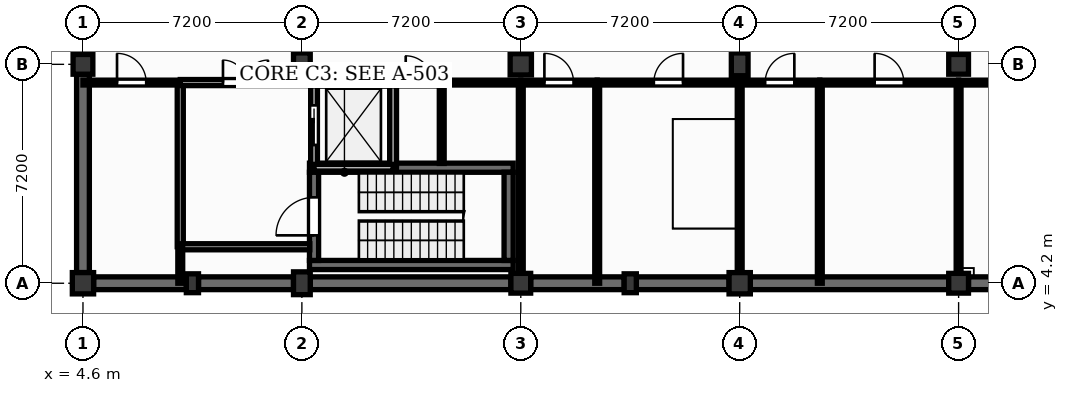
"""IFC4 building model, lengths in metres.
Left out: names, types, materials, properties, quantities, classifications, styles, units other than length and angle.
Written with IfcOpenShell. Run it as: python <this file> out.ifc"""

import sys

from ifc_helpers import new_model, si_unit, direction, frame, frame_2d, origin, origin_2d, place, context, subcontext, project, spatial, rectangle, extrude, element, fill, save


model = new_model("IFC4")
c1 = context("Model", 3, precision=1e-05, world=origin(), true_north=direction((0.0, 1.0)))
c2 = subcontext(c1, "Body", "Model", "MODEL_VIEW")
j1 = project(units=[si_unit("LENGTHUNIT", "METRE"), si_unit("PLANEANGLEUNIT", "RADIAN")], contexts=[c1])
p1 = place(None, origin())
s1 = spatial("IfcSite", under=j1, at=p1, CompositionType="ELEMENT")
p2 = place(p1, origin())
s2 = spatial("IfcBuilding", under=s1, at=p2, CompositionType="ELEMENT")
p3 = place(p2, frame((0.0, 0.0, -4.5)))
s3 = spatial("IfcBuildingStorey", under=s2, at=p3, CompositionType="ELEMENT", Elevation=-4.5)
p4 = place(p3, frame((4.6, 4.2, 0.0), z_axis=(0.0, 0.0, 1.0), x_axis=(1.0, 0.0, 0.0)))
e1 = element("IfcColumn", 1, at=p4, inside=s3, PredefinedType="COLUMN", context=c2, shape_type="SweptSolid", body=[
    extrude(rectangle(XDim=0.7, YDim=0.7, at=origin_2d()), origin(), (0.0, 0.0, 1.0), 4.2),
])
p5 = place(p3, frame((4.6, 11.4, 0.0), z_axis=(0.0, 0.0, 1.0), x_axis=(1.0, 0.0, 0.0)))
e2 = element("IfcColumn", 2, at=p5, inside=s3, PredefinedType="COLUMN", context=c2, shape_type="SweptSolid", body=[
    extrude(rectangle(XDim=0.65, YDim=0.65, at=origin_2d()), origin(), (0.0, 0.0, 1.0), 4.2),
])
for number, where, z_axis, x_axis in (
    (3, (11.8, 4.2, 0.0), (0.0, 0.0, 1.0), (1.0, 0.0, 0.0)),
    (4, (11.8, 11.4, 0.0), (0.0, 0.0, 1.0), (1.0, 0.0, 0.0)),
):
    element("IfcColumn", number, at=place(p3, frame(where, z_axis=z_axis, x_axis=x_axis)), inside=s3, PredefinedType="COLUMN", context=c2, shape_type="SweptSolid", body=[
        extrude(rectangle(XDim=0.55, YDim=0.75, at=origin_2d()), origin(), (0.0, 0.0, 1.0), 4.2),
    ])
p6 = place(p3, frame((19.0, 4.2, 0.0), z_axis=(0.0, 0.0, 1.0), x_axis=(1.0, 0.0, 0.0)))
e5 = element("IfcColumn", 5, at=p6, inside=s3, PredefinedType="COLUMN", context=c2, shape_type="SweptSolid", body=[
    extrude(rectangle(XDim=0.65, YDim=0.65, at=origin_2d()), origin(), (0.0, 0.0, 1.0), 4.2),
])
for number, where, z_axis, x_axis in (
    (6, (19.0, 11.4, 0.0), (0.0, 0.0, 1.0), (1.0, 0.0, 0.0)),
    (7, (26.2, 4.2, 0.0), (0.0, 0.0, 1.0), (1.0, 0.0, 0.0)),
):
    element("IfcColumn", number, at=place(p3, frame(where, z_axis=z_axis, x_axis=x_axis)), inside=s3, PredefinedType="COLUMN", context=c2, shape_type="SweptSolid", body=[
        extrude(rectangle(XDim=0.7, YDim=0.7, at=origin_2d()), origin(), (0.0, 0.0, 1.0), 4.2),
    ])
p7 = place(p3, frame((26.2, 11.4, 0.0), z_axis=(0.0, 0.0, 1.0), x_axis=(1.0, 0.0, 0.0)))
e8 = element("IfcColumn", 8, at=p7, inside=s3, PredefinedType="COLUMN", context=c2, shape_type="SweptSolid", body=[
    extrude(rectangle(XDim=0.55, YDim=0.75, at=origin_2d()), origin(), (0.0, 0.0, 1.0), 4.2),
])
for number, where, z_axis, x_axis in (
    (9, (33.4, 4.2, 0.0), (0.0, 0.0, 1.0), (1.0, 0.0, 0.0)),
    (10, (33.4, 11.4, 0.0), (0.0, 0.0, 1.0), (1.0, 0.0, 0.0)),
):
    element("IfcColumn", number, at=place(p3, frame(where, z_axis=z_axis, x_axis=x_axis)), inside=s3, PredefinedType="COLUMN", context=c2, shape_type="SweptSolid", body=[
        extrude(rectangle(XDim=0.65, YDim=0.65, at=origin_2d()), origin(), (0.0, 0.0, 1.0), 4.2),
    ])
for number, where, z_axis, x_axis in (
    (11, (8.2, 4.2, 0.0), (0.0, 0.0, 1.0), (1.0, 0.0, 0.0)),
    (12, (22.6, 4.2, 0.0), (0.0, 0.0, 1.0), (1.0, 0.0, 0.0)),
):
    element("IfcColumn", number, at=place(p3, frame(where, z_axis=z_axis, x_axis=x_axis)), inside=s3, PredefinedType="PILASTER", context=c2, shape_type="SweptSolid", body=[
        extrude(rectangle(XDim=0.4, YDim=0.62, at=origin_2d()), origin(), (0.0, 0.0, 1.0), 4.2),
    ])
p8 = place(p3, frame((4.95, 4.2, 0.0), z_axis=(0.0, 0.0, 1.0), x_axis=(1.0, 0.0, 0.0)))
e13 = element("IfcWall", 13, at=p8, inside=s3, PredefinedType="USERDEFINED", context=c2, shape_type="SweptSolid", body=[
    extrude(rectangle(XDim=3.05, YDim=0.42, at=frame_2d((1.525, 0.0))), origin(), (0.0, 0.0, 1.0), 4.2),
])
p9 = place(p3, frame((8.4, 4.2, 0.0), z_axis=(0.0, 0.0, 1.0), x_axis=(1.0, 0.0, 0.0)))
e14 = element("IfcWall", 14, at=p9, inside=s3, PredefinedType="USERDEFINED", context=c2, shape_type="SweptSolid", body=[
    extrude(rectangle(XDim=3.125, YDim=0.42, at=frame_2d((1.562, 0.0))), origin(), (0.0, 0.0, 1.0), 4.2),
])
p10 = place(p3, frame((4.6, 4.55, 0.0), z_axis=(0.0, 0.0, 1.0), x_axis=(0.0, 1.0, 0.0)))
e15 = element("IfcWall", 15, at=p10, inside=s3, PredefinedType="USERDEFINED", context=c2, shape_type="SweptSolid", body=[
    extrude(rectangle(XDim=6.525, YDim=0.42, at=frame_2d((3.262, 0.0))), origin(), (0.0, 0.0, 1.0), 4.2),
])
p11 = place(p3, frame((4.6, 11.725, 0.0), z_axis=(0.0, 0.0, 1.0), x_axis=(0.0, 1.0, 0.0)))
e16 = element("IfcWall", 16, at=p11, inside=s3, PredefinedType="USERDEFINED", context=c2, shape_type="SweptSolid", body=[
    extrude(rectangle(XDim=6.55, YDim=0.42, at=frame_2d((3.275, 0.0))), origin(), (0.0, 0.0, 1.0), 4.2),
])
p12 = place(p3, frame((12.075, 4.2, 0.0), z_axis=(0.0, 0.0, 1.0), x_axis=(1.0, 0.0, 0.0)))
e17 = element("IfcWall", 17, at=p12, inside=s3, PredefinedType="USERDEFINED", context=c2, shape_type="SweptSolid", body=[
    extrude(rectangle(XDim=6.6, YDim=0.42, at=frame_2d((3.3, 0.0))), origin(), (0.0, 0.0, 1.0), 4.2),
])
p13 = place(p3, frame((19.325, 4.2, 0.0), z_axis=(0.0, 0.0, 1.0), x_axis=(1.0, 0.0, 0.0)))
e18 = element("IfcWall", 18, at=p13, inside=s3, PredefinedType="USERDEFINED", context=c2, shape_type="SweptSolid", body=[
    extrude(rectangle(XDim=3.075, YDim=0.42, at=frame_2d((1.538, 0.0))), origin(), (0.0, 0.0, 1.0), 4.2),
])
p14 = place(p3, frame((22.8, 4.2, 0.0), z_axis=(0.0, 0.0, 1.0), x_axis=(1.0, 0.0, 0.0)))
e19 = element("IfcWall", 19, at=p14, inside=s3, PredefinedType="USERDEFINED", context=c2, shape_type="SweptSolid", body=[
    extrude(rectangle(XDim=3.05, YDim=0.42, at=frame_2d((1.525, 0.0))), origin(), (0.0, 0.0, 1.0), 4.2),
])
p15 = place(p3, frame((26.55, 4.2, 0.0), z_axis=(0.0, 0.0, 1.0), x_axis=(1.0, 0.0, 0.0)))
e20 = element("IfcWall", 20, at=p15, inside=s3, PredefinedType="USERDEFINED", context=c2, shape_type="SweptSolid", body=[
    extrude(rectangle(XDim=6.525, YDim=0.42, at=frame_2d((3.262, 0.0))), origin(), (0.0, 0.0, 1.0), 4.2),
])
p16 = place(p3, frame((33.725, 4.2, 0.0), z_axis=(0.0, 0.0, 1.0), x_axis=(1.0, 0.0, 0.0)))
e21 = element("IfcWall", 21, at=p16, inside=s3, PredefinedType="USERDEFINED", context=c2, shape_type="SweptSolid", body=[
    extrude(rectangle(XDim=3.075, YDim=0.42, at=frame_2d((1.538, 0.0))), origin(), (0.0, 0.0, 1.0), 4.2),
])
for number, where, z_axis, x_axis in (
    (22, (12.05, 4.8, 0.0), (0.0, 0.0, 1.0), (1.0, 0.0, 0.0)),
    (23, (12.05, 8.0, 0.0), (0.0, 0.0, 1.0), (1.0, 0.0, 0.0)),
):
    element("IfcWall", number, at=place(p3, frame(where, z_axis=z_axis, x_axis=x_axis)), inside=s3, PredefinedType="SHEAR", context=c2, shape_type="SweptSolid", body=[
        extrude(rectangle(XDim=6.7, YDim=0.3, at=frame_2d((3.35, 0.0))), origin(), (0.0, 0.0, 1.0), 4.25),
    ])
p17 = place(p3, frame((12.2, 4.95, 0.0), z_axis=(0.0, 0.0, 1.0), x_axis=(0.0, 1.0, 0.0)))
e24 = element("IfcWall", 24, at=p17, inside=s3, PredefinedType="SHEAR", context=c2, shape_type="SweptSolid", body=[
    extrude(rectangle(XDim=2.9, YDim=0.3, at=frame_2d((1.45, 0.0))), origin(), (0.0, 0.0, 1.0), 4.25),
])
p18 = place(p17, frame((0.825, 0.0, 0.0)))
e25 = element("IfcOpeningElement", 25, at=p18, cuts=e24, PredefinedType="OPENING", context=c2, shape_type="SweptSolid", body=[
    extrude(rectangle(XDim=1.25, YDim=2.15, at=frame_2d((0.625, 1.075))), frame((0.0, 0.16, 0.0), z_axis=(0.0, -1.0, 0.0), x_axis=(1.0, 0.0, 0.0)), (0.0, 0.0, 1.0), 0.32),
])
p19 = place(p3, frame((18.6, 4.95, 0.0), z_axis=(0.0, 0.0, 1.0), x_axis=(0.0, 1.0, 0.0)))
e26 = element("IfcWall", 26, at=p19, inside=s3, PredefinedType="SHEAR", context=c2, shape_type="SweptSolid", body=[
    extrude(rectangle(XDim=2.9, YDim=0.3, at=frame_2d((1.45, 0.0))), origin(), (0.0, 0.0, 1.0), 4.25),
])
p20 = place(p3, frame((12.2, 10.8, 0.0), z_axis=(0.0, 0.0, 1.0), x_axis=(1.0, 0.0, 0.0)))
e27 = element("IfcWall", 27, at=p20, inside=s3, PredefinedType="SOLIDWALL", context=c2, shape_type="SweptSolid", body=[
    extrude(rectangle(XDim=2.6, YDim=0.22, at=frame_2d((1.3, 0.0))), origin(), (0.0, 0.0, 1.0), 4.25),
])
p21 = place(p3, frame((12.2, 8.11, 0.0), z_axis=(0.0, 0.0, 1.0), x_axis=(0.0, 1.0, 0.0)))
e28 = element("IfcWall", 28, at=p21, inside=s3, PredefinedType="SOLIDWALL", context=c2, shape_type="SweptSolid", body=[
    extrude(rectangle(XDim=2.58, YDim=0.22, at=frame_2d((1.29, 0.0))), origin(), (0.0, 0.0, 1.0), 4.25),
])
p22 = place(p21, frame((0.64, 0.0, 0.0)))
e29 = element("IfcOpeningElement", 29, at=p22, cuts=e28, PredefinedType="OPENING", context=c2, shape_type="SweptSolid", body=[
    extrude(rectangle(XDim=1.3, YDim=2.2, at=frame_2d((0.65, 1.1))), frame((0.0, 0.12, 0.0), z_axis=(0.0, -1.0, 0.0), x_axis=(1.0, 0.0, 0.0)), (0.0, 0.0, 1.0), 0.24),
])
p23 = place(p3, frame((14.8, 8.11, 0.0), z_axis=(0.0, 0.0, 1.0), x_axis=(0.0, 1.0, 0.0)))
e30 = element("IfcWall", 30, at=p23, inside=s3, PredefinedType="SOLIDWALL", context=c2, shape_type="SweptSolid", body=[
    extrude(rectangle(XDim=2.58, YDim=0.22, at=frame_2d((1.29, 0.0))), origin(), (0.0, 0.0, 1.0), 4.25),
])
for number, where, z_axis, x_axis in (
    (31, (12.2, 8.0, -0.9), (0.0, 0.0, 1.0), (0.0, 1.0, 0.0)),
    (32, (14.8, 8.0, -0.9), (0.0, 0.0, 1.0), (0.0, 1.0, 0.0)),
):
    element("IfcWall", number, at=place(p3, frame(where, z_axis=z_axis, x_axis=x_axis)), inside=s3, PredefinedType="SOLIDWALL", context=c2, shape_type="SweptSolid", body=[
        extrude(rectangle(XDim=2.8, YDim=0.22, at=frame_2d((1.4, 0.0))), origin(), (0.0, 0.0, 1.0), 0.9),
    ])
for number, where, z_axis, x_axis in (
    (33, (12.2, 8.0, -0.9), (0.0, 0.0, 1.0), (1.0, 0.0, 0.0)),
    (34, (12.2, 10.8, -0.9), (0.0, 0.0, 1.0), (1.0, 0.0, 0.0)),
):
    element("IfcWall", number, at=place(p3, frame(where, z_axis=z_axis, x_axis=x_axis)), inside=s3, PredefinedType="SOLIDWALL", context=c2, shape_type="SweptSolid", body=[
        extrude(rectangle(XDim=2.6, YDim=0.22, at=frame_2d((1.3, 0.0))), origin(), (0.0, 0.0, 1.0), 0.9),
    ])
p24 = place(p3, frame((4.6, 10.8, 0.0), z_axis=(0.0, 0.0, 1.0), x_axis=(1.0, 0.0, 0.0)))
e35 = element("IfcWall", 35, at=p24, inside=s3, PredefinedType="PARTITIONING", context=c2, shape_type="SweptSolid", body=[
    extrude(rectangle(XDim=3.2, YDim=0.16, at=frame_2d((1.6, 0.0))), origin(), (0.0, 0.0, 1.0), 4.08),
])
p25 = place(p24, frame((1.12, 0.0, 0.0)))
e36 = element("IfcOpeningElement", 36, at=p25, cuts=e35, PredefinedType="OPENING", context=c2, shape_type="SweptSolid", body=[
    extrude(rectangle(XDim=0.96, YDim=2.1, at=frame_2d((0.48, 1.05))), frame((0.0, 0.09, 0.0), z_axis=(0.0, -1.0, 0.0), x_axis=(1.0, 0.0, 0.0)), (0.0, 0.0, 1.0), 0.18),
])
p26 = place(p3, frame((7.8, 5.4, 0.0), z_axis=(0.0, 0.0, 1.0), x_axis=(0.0, 1.0, 0.0)))
e37 = element("IfcWall", 37, at=p26, inside=s3, PredefinedType="PARTITIONING", context=c2, shape_type="SweptSolid", body=[
    extrude(rectangle(XDim=5.33, YDim=0.2, at=frame_2d((2.665, 0.0))), origin(), (0.0, 0.0, 1.0), 4.08),
])
p27 = place(p3, frame((7.8, 10.8, 0.0), z_axis=(0.0, 0.0, 1.0), x_axis=(1.0, 0.0, 0.0)))
e38 = element("IfcWall", 38, at=p27, inside=s3, PredefinedType="PARTITIONING", context=c2, shape_type="SweptSolid", body=[
    extrude(rectangle(XDim=4.29, YDim=0.2, at=frame_2d((2.145, 0.0))), origin(), (0.0, 0.0, 1.0), 4.08),
])
p28 = place(p27, frame((1.405, 0.0, 0.0)))
e39 = element("IfcOpeningElement", 39, at=p28, cuts=e38, PredefinedType="OPENING", context=c2, shape_type="SweptSolid", body=[
    extrude(rectangle(XDim=1.48, YDim=2.25, at=frame_2d((0.74, 1.125))), frame((0.0, 0.11, 0.0), z_axis=(0.0, -1.0, 0.0), x_axis=(1.0, 0.0, 0.0)), (0.0, 0.0, 1.0), 0.22),
])
p29 = place(p3, frame((14.91, 10.8, 0.0), z_axis=(0.0, 0.0, 1.0), x_axis=(1.0, 0.0, 0.0)))
e40 = element("IfcWall", 40, at=p29, inside=s3, PredefinedType="SOLIDWALL", context=c2, shape_type="SweptSolid", body=[
    extrude(rectangle(XDim=1.49, YDim=0.22, at=frame_2d((0.745, 0.0))), origin(), (0.0, 0.0, 1.0), 4.08),
])
p30 = place(p29, frame((0.305, 0.0, 0.0)))
e41 = element("IfcOpeningElement", 41, at=p30, cuts=e40, PredefinedType="OPENING", context=c2, shape_type="SweptSolid", body=[
    extrude(rectangle(XDim=0.88, YDim=2.05, at=frame_2d((0.44, 1.025))), frame((0.0, 0.12, 0.0), z_axis=(0.0, -1.0, 0.0), x_axis=(1.0, 0.0, 0.0)), (0.0, 0.0, 1.0), 0.24),
])
p31 = place(p3, frame((19.0, 10.8, 0.0), z_axis=(0.0, 0.0, 1.0), x_axis=(1.0, 0.0, 0.0)))
e42 = element("IfcWall", 42, at=p31, inside=s3, PredefinedType="PARTITIONING", context=c2, shape_type="SweptSolid", body=[
    extrude(rectangle(XDim=2.513, YDim=0.16, at=frame_2d((1.256, 0.0))), origin(), (0.0, 0.0, 1.0), 4.08),
])
p32 = place(p31, frame((0.777, 0.0, 0.0)))
e43 = element("IfcOpeningElement", 43, at=p32, cuts=e42, PredefinedType="OPENING", context=c2, shape_type="SweptSolid", body=[
    extrude(rectangle(XDim=0.96, YDim=2.1, at=frame_2d((0.48, 1.05))), frame((0.0, 0.09, 0.0), z_axis=(0.0, -1.0, 0.0), x_axis=(1.0, 0.0, 0.0)), (0.0, 0.0, 1.0), 0.18),
])
p33 = place(p3, frame((21.513, 4.2, 0.0), z_axis=(0.0, 0.0, 1.0), x_axis=(0.0, 1.0, 0.0)))
e44 = element("IfcWall", 44, at=p33, inside=s3, PredefinedType="PARTITIONING", context=c2, shape_type="SweptSolid", body=[
    extrude(rectangle(XDim=6.53, YDim=0.16, at=frame_2d((3.265, 0.0))), origin(), (0.0, 0.0, 1.0), 4.08),
])
p34 = place(p3, frame((21.513, 10.8, 0.0), z_axis=(0.0, 0.0, 1.0), x_axis=(1.0, 0.0, 0.0)))
e45 = element("IfcWall", 45, at=p34, inside=s3, PredefinedType="PARTITIONING", context=c2, shape_type="SweptSolid", body=[
    extrude(rectangle(XDim=4.687, YDim=0.16, at=frame_2d((2.344, 0.0))), origin(), (0.0, 0.0, 1.0), 4.08),
])
p35 = place(p34, frame((1.864, 0.0, 0.0)))
e46 = element("IfcOpeningElement", 46, at=p35, cuts=e45, PredefinedType="OPENING", context=c2, shape_type="SweptSolid", body=[
    extrude(rectangle(XDim=0.96, YDim=2.1, at=frame_2d((0.48, 1.05))), frame((0.0, 0.09, 0.0), z_axis=(0.0, -1.0, 0.0), x_axis=(1.0, 0.0, 0.0)), (0.0, 0.0, 1.0), 0.18),
])
p36 = place(p3, frame((26.2, 4.55, 0.0), z_axis=(0.0, 0.0, 1.0), x_axis=(0.0, 1.0, 0.0)))
e47 = element("IfcWall", 47, at=p36, inside=s3, PredefinedType="PARTITIONING", context=c2, shape_type="SweptSolid", body=[
    extrude(rectangle(XDim=6.18, YDim=0.16, at=frame_2d((3.09, 0.0))), origin(), (0.0, 0.0, 1.0), 3.5),
])
p37 = place(p3, frame((26.2, 10.8, 0.0), z_axis=(0.0, 0.0, 1.0), x_axis=(1.0, 0.0, 0.0)))
e48 = element("IfcWall", 48, at=p37, inside=s3, PredefinedType="PARTITIONING", context=c2, shape_type="SweptSolid", body=[
    extrude(rectangle(XDim=2.635, YDim=0.16, at=frame_2d((1.317, 0.0))), origin(), (0.0, 0.0, 1.0), 4.08),
])
p38 = place(p37, frame((0.837, 0.0, 0.0)))
e49 = element("IfcOpeningElement", 49, at=p38, cuts=e48, PredefinedType="OPENING", context=c2, shape_type="SweptSolid", body=[
    extrude(rectangle(XDim=0.96, YDim=2.1, at=frame_2d((0.48, 1.05))), frame((0.0, 0.09, 0.0), z_axis=(0.0, -1.0, 0.0), x_axis=(1.0, 0.0, 0.0)), (0.0, 0.0, 1.0), 0.18),
])
p39 = place(p3, frame((28.835, 4.2, 0.0), z_axis=(0.0, 0.0, 1.0), x_axis=(0.0, 1.0, 0.0)))
e50 = element("IfcWall", 50, at=p39, inside=s3, PredefinedType="PARTITIONING", context=c2, shape_type="SweptSolid", body=[
    extrude(rectangle(XDim=6.53, YDim=0.16, at=frame_2d((3.265, 0.0))), origin(), (0.0, 0.0, 1.0), 4.08),
])
p40 = place(p3, frame((28.835, 10.8, 0.0), z_axis=(0.0, 0.0, 1.0), x_axis=(1.0, 0.0, 0.0)))
e51 = element("IfcWall", 51, at=p40, inside=s3, PredefinedType="PARTITIONING", context=c2, shape_type="SweptSolid", body=[
    extrude(rectangle(XDim=4.565, YDim=0.16, at=frame_2d((2.282, 0.0))), origin(), (0.0, 0.0, 1.0), 4.08),
])
p41 = place(p40, frame((1.802, 0.0, 0.0)))
e52 = element("IfcOpeningElement", 52, at=p41, cuts=e51, PredefinedType="OPENING", context=c2, shape_type="SweptSolid", body=[
    extrude(rectangle(XDim=0.96, YDim=2.1, at=frame_2d((0.48, 1.05))), frame((0.0, 0.09, 0.0), z_axis=(0.0, -1.0, 0.0), x_axis=(1.0, 0.0, 0.0)), (0.0, 0.0, 1.0), 0.18),
])
p42 = place(p3, frame((33.4, 4.525, 0.0), z_axis=(0.0, 0.0, 1.0), x_axis=(0.0, 1.0, 0.0)))
e53 = element("IfcWall", 53, at=p42, inside=s3, PredefinedType="PARTITIONING", context=c2, shape_type="SweptSolid", body=[
    extrude(rectangle(XDim=6.205, YDim=0.16, at=frame_2d((3.103, 0.0))), origin(), (0.0, 0.0, 1.0), 3.5),
])
p43 = place(p3, frame((33.4, 10.8, 0.0), z_axis=(0.0, 0.0, 1.0), x_axis=(1.0, 0.0, 0.0)))
e54 = element("IfcWall", 54, at=p43, inside=s3, PredefinedType="PARTITIONING", context=c2, shape_type="SweptSolid", body=[
    extrude(rectangle(XDim=7.2, YDim=0.16, at=frame_2d((3.6, 0.0))), origin(), (0.0, 0.0, 1.0), 4.08),
])
p44 = place(p43, frame((3.12, 0.0, 0.0)))
e55 = element("IfcOpeningElement", 55, at=p44, cuts=e54, PredefinedType="OPENING", context=c2, shape_type="SweptSolid", body=[
    extrude(rectangle(XDim=0.96, YDim=2.1, at=frame_2d((0.48, 1.05))), frame((0.0, 0.09, 0.0), z_axis=(0.0, -1.0, 0.0), x_axis=(1.0, 0.0, 0.0)), (0.0, 0.0, 1.0), 0.18),
])
p45 = place(p3, frame((16.4, 8.14, 0.0), z_axis=(0.0, 0.0, 1.0), x_axis=(0.0, 1.0, 0.0)))
e56 = element("IfcWall", 56, at=p45, inside=s3, PredefinedType="PARTITIONING", context=c2, shape_type="SweptSolid", body=[
    extrude(rectangle(XDim=2.59, YDim=0.16, at=frame_2d((1.295, 0.0))), origin(), (0.0, 0.0, 1.0), 4.08),
])
p46 = place(p3, frame((7.8, 5.4, 0.0), z_axis=(0.0, 0.0, 1.0), x_axis=(1.0, 0.0, 0.0)))
e57 = element("IfcWall", 57, at=p46, inside=s3, PredefinedType="PARTITIONING", context=c2, shape_type="SweptSolid", body=[
    extrude(rectangle(XDim=4.26, YDim=0.2, at=frame_2d((2.13, 0.0))), origin(), (0.0, 0.0, 1.0), 4.08),
])
p47 = place(p3, frame((16.4, 10.8, 0.0), z_axis=(0.0, 0.0, 1.0), x_axis=(1.0, 0.0, 0.0)))
e58 = element("IfcWall", 58, at=p47, inside=s3, PredefinedType="PARTITIONING", context=c2, shape_type="SweptSolid", body=[
    extrude(rectangle(XDim=2.6, YDim=0.16, at=frame_2d((1.3, 0.0))), origin(), (0.0, 0.0, 1.0), 4.08),
])
p48 = place(p3, frame((7.8, 4.2, 0.0), z_axis=(0.0, 0.0, 1.0), x_axis=(0.0, 1.0, 0.0)))
e59 = element("IfcWall", 59, at=p48, inside=s3, PredefinedType="PARTITIONING", context=c2, shape_type="SweptSolid", body=[
    extrude(rectangle(XDim=1.2, YDim=0.16, at=frame_2d((0.6, 0.0))), origin(), (0.0, 0.0, 1.0), 4.08),
])
p49 = place(p3, frame((19.0, 4.525, 0.0), z_axis=(0.0, 0.0, 1.0), x_axis=(0.0, 1.0, 0.0)))
e60 = element("IfcWall", 60, at=p49, inside=s3, PredefinedType="PARTITIONING", context=c2, shape_type="SweptSolid", body=[
    extrude(rectangle(XDim=6.205, YDim=0.16, at=frame_2d((3.103, 0.0))), origin(), (0.0, 0.0, 1.0), 3.5),
])
p50 = place(p22, origin())
e61 = element("IfcDoor", 61, at=p50, inside=s3, OperationType="SLIDING_TO_LEFT", PredefinedType="DOOR", context=c2, shape_type="SweptSolid", body=[
    extrude(rectangle(XDim=1.3, YDim=2.2, at=frame_2d((0.65, 1.1))), frame((0.0, 0.025, 0.0), z_axis=(0.0, -1.0, 0.0), x_axis=(1.0, 0.0, 0.0)), (0.0, 0.0, 1.0), 0.05),
])
fill(e29, e61)
p51 = place(p18, origin())
e62 = element("IfcDoor", 62, at=p51, inside=s3, OperationType="SINGLE_SWING_LEFT", PredefinedType="DOOR", context=c2, shape_type="SweptSolid", body=[
    extrude(rectangle(XDim=1.25, YDim=2.15, at=frame_2d((0.625, 1.075))), frame((0.0, 0.025, 0.0), z_axis=(0.0, -1.0, 0.0), x_axis=(1.0, 0.0, 0.0)), (0.0, 0.0, 1.0), 0.05),
])
fill(e25, e62)
p52 = place(p28, origin())
e63 = element("IfcDoor", 63, at=p52, inside=s3, OperationType="DOUBLE_DOOR_SINGLE_SWING", PredefinedType="DOOR", context=c2, shape_type="SweptSolid", body=[
    extrude(rectangle(XDim=1.48, YDim=2.25, at=frame_2d((0.74, 1.125))), frame((0.0, 0.025, 0.0), z_axis=(0.0, -1.0, 0.0), x_axis=(1.0, 0.0, 0.0)), (0.0, 0.0, 1.0), 0.05),
])
fill(e39, e63)
p53 = place(p30, origin())
e64 = element("IfcDoor", 64, at=p53, inside=s3, OperationType="SINGLE_SWING_LEFT", PredefinedType="DOOR", context=c2, shape_type="SweptSolid", body=[
    extrude(rectangle(XDim=0.88, YDim=2.05, at=frame_2d((0.44, 1.025))), frame((0.0, 0.025, 0.0), z_axis=(0.0, -1.0, 0.0), x_axis=(1.0, 0.0, 0.0)), (0.0, 0.0, 1.0), 0.05),
])
fill(e41, e64)
p54 = place(p25, origin())
e65 = element("IfcDoor", 65, at=p54, inside=s3, OperationType="SINGLE_SWING_LEFT", PredefinedType="DOOR", context=c2, shape_type="SweptSolid", body=[
    extrude(rectangle(XDim=0.96, YDim=2.1, at=frame_2d((0.48, 1.05))), frame((0.0, 0.025, 0.0), z_axis=(0.0, -1.0, 0.0), x_axis=(1.0, 0.0, 0.0)), (0.0, 0.0, 1.0), 0.05),
])
fill(e36, e65)
p55 = place(p32, origin())
e66 = element("IfcDoor", 66, at=p55, inside=s3, OperationType="SINGLE_SWING_LEFT", PredefinedType="DOOR", context=c2, shape_type="SweptSolid", body=[
    extrude(rectangle(XDim=0.96, YDim=2.1, at=frame_2d((0.48, 1.05))), frame((0.0, 0.025, 0.0), z_axis=(0.0, -1.0, 0.0), x_axis=(1.0, 0.0, 0.0)), (0.0, 0.0, 1.0), 0.05),
])
fill(e43, e66)
p56 = place(p35, origin())
e67 = element("IfcDoor", 67, at=p56, inside=s3, OperationType="SINGLE_SWING_RIGHT", PredefinedType="DOOR", context=c2, shape_type="SweptSolid", body=[
    extrude(rectangle(XDim=0.96, YDim=2.1, at=frame_2d((0.48, 1.05))), frame((0.0, 0.025, 0.0), z_axis=(0.0, -1.0, 0.0), x_axis=(1.0, 0.0, 0.0)), (0.0, 0.0, 1.0), 0.05),
])
fill(e46, e67)
p57 = place(p38, origin())
e68 = element("IfcDoor", 68, at=p57, inside=s3, OperationType="SINGLE_SWING_RIGHT", PredefinedType="DOOR", context=c2, shape_type="SweptSolid", body=[
    extrude(rectangle(XDim=0.96, YDim=2.1, at=frame_2d((0.48, 1.05))), frame((0.0, 0.025, 0.0), z_axis=(0.0, -1.0, 0.0), x_axis=(1.0, 0.0, 0.0)), (0.0, 0.0, 1.0), 0.05),
])
fill(e49, e68)
p58 = place(p41, origin())
e69 = element("IfcDoor", 69, at=p58, inside=s3, OperationType="SINGLE_SWING_LEFT", PredefinedType="DOOR", context=c2, shape_type="SweptSolid", body=[
    extrude(rectangle(XDim=0.96, YDim=2.1, at=frame_2d((0.48, 1.05))), frame((0.0, 0.025, 0.0), z_axis=(0.0, -1.0, 0.0), x_axis=(1.0, 0.0, 0.0)), (0.0, 0.0, 1.0), 0.05),
])
fill(e52, e69)
save(model, sys.argv[1])
